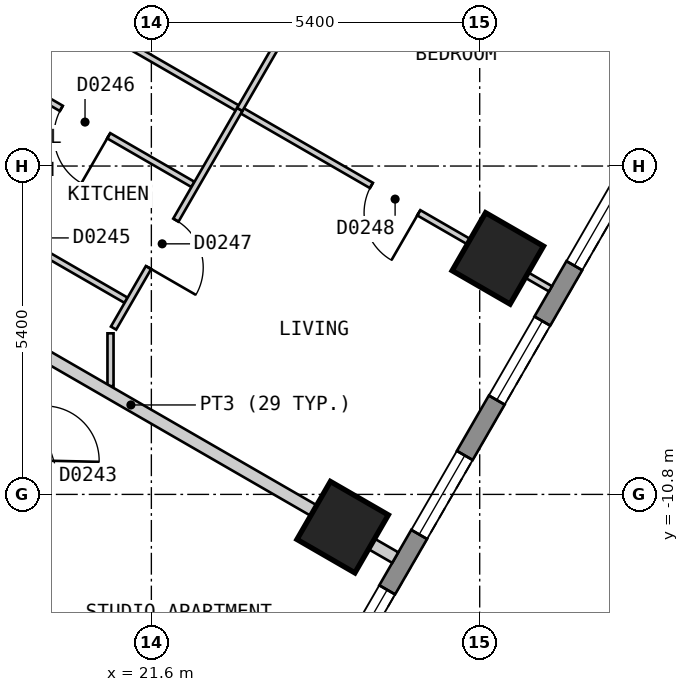
"""IFC4 building model, lengths in metres.
Left out: names, types, materials, properties, quantities, classifications, styles, units other than length and angle.
Written with IfcOpenShell. Run it as: python <this file> out.ifc"""

import sys

from ifc_helpers import new_model, si_unit, direction, frame, frame_2d, origin, origin_2d, place, context, subcontext, project, spatial, polyline, rectangle, outline, extrude, element, fill, save


model = new_model("IFC4")
c1 = context("Model", 3, precision=1e-05, world=origin(), true_north=direction((0.0, 1.0)))
c2 = subcontext(c1, "Body", "Model", "MODEL_VIEW")
j1 = project(units=[si_unit("LENGTHUNIT", "METRE"), si_unit("PLANEANGLEUNIT", "RADIAN")], contexts=[c1])
p1 = place(None, origin())
s1 = spatial("IfcSite", under=j1, at=p1, CompositionType="ELEMENT")
p2 = place(p1, origin())
s2 = spatial("IfcBuilding", under=s1, at=p2, CompositionType="ELEMENT")
p3 = place(p2, frame((0.0, 0.0, 41.4)))
s3 = spatial("IfcBuildingStorey", under=s2, at=p3, CompositionType="ELEMENT", Elevation=41.4)
for number, where, z_axis, x_axis in (
    (1, (24.746, -11.339, 0.0), (0.0, 0.0, 1.0), (0.5, 0.866, 0.0)),
    (2, (27.298, -6.919, 0.0), (0.0, 0.0, 1.0), (0.5, 0.866, 0.0)),
):
    element("IfcColumn", number, at=place(p3, frame(where, z_axis=z_axis, x_axis=x_axis)), inside=s3, PredefinedType="COLUMN", context=c2, shape_type="SweptSolid", body=[
        extrude(rectangle(XDim=1.1, YDim=1.1, at=origin_2d()), origin(), (0.0, 0.0, 1.0), 3.0),
    ])
p4 = place(p3, frame((17.71, -25.825, 0.0), z_axis=(0.0, 0.0, 1.0), x_axis=(0.500001938803, 0.866024284413, 0.0)))
e3 = element("IfcWall", 3, at=p4, inside=s3, PredefinedType="SOLIDWALL", context=c2, shape_type="SweptSolid", body=[
    extrude(outline(polyline([(0.0, -0.15), (27.02, -0.15), (26.94, 0.15), (0.08, 0.15), (0.0, -0.15)])), origin(), (0.0, 0.0, 1.0), 2.7),
])
p5 = place(p4, frame((1.277, 0.0, 0.15)))
e4 = element("IfcOpeningElement", 4, at=p5, cuts=e3, PredefinedType="OPENING", context=c2, shape_type="SweptSolid", body=[
    extrude(rectangle(XDim=1.5, YDim=2.1, at=frame_2d((0.75, 1.05))), frame((0.0, 0.16, 0.0), z_axis=(0.0, -1.0, 0.0), x_axis=(1.0, 0.0, 0.0)), (0.0, 0.0, 1.0), 0.32),
])
p6 = place(p4, frame((3.829, 0.0, 0.15)))
e5 = element("IfcOpeningElement", 5, at=p6, cuts=e3, PredefinedType="OPENING", context=c2, shape_type="SweptSolid", body=[
    extrude(rectangle(XDim=1.5, YDim=2.1, at=frame_2d((0.75, 1.05))), frame((0.0, 0.16, 0.0), z_axis=(0.0, -1.0, 0.0), x_axis=(1.0, 0.0, 0.0)), (0.0, 0.0, 1.0), 0.32),
])
p7 = place(p4, frame((6.382, 0.0, 0.15)))
e6 = element("IfcOpeningElement", 6, at=p7, cuts=e3, PredefinedType="OPENING", context=c2, shape_type="SweptSolid", body=[
    extrude(rectangle(XDim=1.5, YDim=2.1, at=frame_2d((0.75, 1.05))), frame((0.0, 0.16, 0.0), z_axis=(0.0, -1.0, 0.0), x_axis=(1.0, 0.0, 0.0)), (0.0, 0.0, 1.0), 0.32),
])
p8 = place(p4, frame((8.933, 0.0, 0.15)))
e7 = element("IfcOpeningElement", 7, at=p8, cuts=e3, PredefinedType="OPENING", context=c2, shape_type="SweptSolid", body=[
    extrude(rectangle(XDim=1.5, YDim=2.1, at=frame_2d((0.75, 1.05))), frame((0.0, 0.16, 0.0), z_axis=(0.0, -1.0, 0.0), x_axis=(1.0, 0.0, 0.0)), (0.0, 0.0, 1.0), 0.32),
])
p9 = place(p4, frame((11.485, 0.0, 0.15)))
e8 = element("IfcOpeningElement", 8, at=p9, cuts=e3, PredefinedType="OPENING", context=c2, shape_type="SweptSolid", body=[
    extrude(rectangle(XDim=1.5, YDim=2.1, at=frame_2d((0.75, 1.05))), frame((0.0, 0.16, 0.0), z_axis=(0.0, -1.0, 0.0), x_axis=(1.0, 0.0, 0.0)), (0.0, 0.0, 1.0), 0.32),
])
p10 = place(p4, frame((14.037, 0.0, 0.15)))
e9 = element("IfcOpeningElement", 9, at=p10, cuts=e3, PredefinedType="OPENING", context=c2, shape_type="SweptSolid", body=[
    extrude(rectangle(XDim=1.5, YDim=2.1, at=frame_2d((0.75, 1.05))), frame((0.0, 0.16, 0.0), z_axis=(0.0, -1.0, 0.0), x_axis=(1.0, 0.0, 0.0)), (0.0, 0.0, 1.0), 0.32),
])
p11 = place(p4, frame((16.589, 0.0, 0.15)))
e10 = element("IfcOpeningElement", 10, at=p11, cuts=e3, PredefinedType="OPENING", context=c2, shape_type="SweptSolid", body=[
    extrude(rectangle(XDim=1.5, YDim=2.1, at=frame_2d((0.75, 1.05))), frame((0.0, 0.16, 0.0), z_axis=(0.0, -1.0, 0.0), x_axis=(1.0, 0.0, 0.0)), (0.0, 0.0, 1.0), 0.32),
])
p12 = place(p4, frame((19.141, 0.0, 0.15)))
e11 = element("IfcOpeningElement", 11, at=p12, cuts=e3, PredefinedType="OPENING", context=c2, shape_type="SweptSolid", body=[
    extrude(rectangle(XDim=1.5, YDim=2.1, at=frame_2d((0.75, 1.05))), frame((0.0, 0.16, 0.0), z_axis=(0.0, -1.0, 0.0), x_axis=(1.0, 0.0, 0.0)), (0.0, 0.0, 1.0), 0.32),
])
p13 = place(p4, frame((21.693, 0.0, 0.15)))
e12 = element("IfcOpeningElement", 12, at=p13, cuts=e3, PredefinedType="OPENING", context=c2, shape_type="SweptSolid", body=[
    extrude(rectangle(XDim=1.5, YDim=2.1, at=frame_2d((0.75, 1.05))), frame((0.0, 0.16, 0.0), z_axis=(0.0, -1.0, 0.0), x_axis=(1.0, 0.0, 0.0)), (0.0, 0.0, 1.0), 0.32),
])
p14 = place(p4, frame((24.244, 0.0, 0.15)))
e13 = element("IfcOpeningElement", 13, at=p14, cuts=e3, PredefinedType="OPENING", context=c2, shape_type="SweptSolid", body=[
    extrude(rectangle(XDim=1.5, YDim=2.1, at=frame_2d((0.75, 1.05))), frame((0.0, 0.16, 0.0), z_axis=(0.0, -1.0, 0.0), x_axis=(1.0, 0.0, 0.0)), (0.0, 0.0, 1.0), 0.32),
])
p15 = place(p3, frame((16.864, -6.789, 0.0), z_axis=(0.0, 0.0, 1.0), x_axis=(0.500058020612, 0.865991902977, 0.0)))
e14 = element("IfcWall", 14, at=p15, inside=s3, PredefinedType="PARTITIONING", context=c2, shape_type="SweptSolid", body=[
    extrude(rectangle(XDim=7.725, YDim=0.2, at=frame_2d((3.863, 0.0))), origin(), (0.0, 0.0, 1.0), 2.7),
])
p16 = place(p15, frame((2.052, 0.0, 0.0)))
e15 = element("IfcOpeningElement", 15, at=p16, cuts=e14, PredefinedType="OPENING", context=c2, shape_type="SweptSolid", body=[
    extrude(rectangle(XDim=1.0, YDim=2.1, at=frame_2d((0.5, 1.05))), frame((0.0, 0.11, 0.0), z_axis=(0.0, -1.0, 0.0), x_axis=(1.0, 0.0, 0.0)), (0.0, 0.0, 1.0), 0.22),
])
p17 = place(p3, frame((17.677, -5.582, 0.0), z_axis=(0.0, 0.0, 1.0), x_axis=(0.866015917575, -0.500016430238, 0.0)))
e16 = element("IfcWall", 16, at=p17, inside=s3, PredefinedType="PARTITIONING", context=c2, shape_type="SweptSolid", body=[
    extrude(rectangle(XDim=4.05, YDim=0.1, at=frame_2d((2.025, 0.0))), origin(), (0.0, 0.0, 1.0), 2.7),
])
p18 = place(p17, frame((1.6, 0.0, 0.0)))
e17 = element("IfcOpeningElement", 17, at=p18, cuts=e16, PredefinedType="OPENING", context=c2, shape_type="SweptSolid", body=[
    extrude(rectangle(XDim=0.8, YDim=2.1, at=frame_2d((0.4, 1.05))), frame((0.0, 0.06, 0.0), z_axis=(0.0, -1.0, 0.0), x_axis=(1.0, 0.0, 0.0)), (0.0, 0.0, 1.0), 0.12),
])
p19 = place(p3, frame((18.777, -3.677, 0.0), z_axis=(0.0, 0.0, 1.0), x_axis=(0.866000843773, -0.500042536776, 0.0)))
e18 = element("IfcWall", 18, at=p19, inside=s3, PredefinedType="PARTITIONING", context=c2, shape_type="SweptSolid", body=[
    extrude(rectangle(XDim=4.05, YDim=0.1, at=frame_2d((2.025, 0.0))), origin(), (0.0, 0.0, 1.0), 2.7),
])
p20 = place(p19, frame((1.55, 0.0, 0.0)))
e19 = element("IfcOpeningElement", 19, at=p20, cuts=e18, PredefinedType="OPENING", context=c2, shape_type="SweptSolid", body=[
    extrude(rectangle(XDim=0.9, YDim=2.1, at=frame_2d((0.45, 1.05))), frame((0.0, 0.06, 0.0), z_axis=(0.0, -1.0, 0.0), x_axis=(1.0, 0.0, 0.0)), (0.0, 0.0, 1.0), 0.12),
])
p21 = place(p3, frame((19.503, -2.419, 0.0), z_axis=(0.0, 0.0, 1.0), x_axis=(0.866047370643, -0.499961950354, 0.0)))
e20 = element("IfcWall", 20, at=p21, inside=s3, PredefinedType="PARTITIONING", context=c2, shape_type="SweptSolid", body=[
    extrude(rectangle(XDim=10.001, YDim=0.1, at=frame_2d((5.0, 0.0))), origin(), (0.0, 0.0, 1.0), 2.7),
])
p22 = place(p21, frame((6.6, 0.0, 0.0)))
e21 = element("IfcOpeningElement", 21, at=p22, cuts=e20, PredefinedType="OPENING", context=c2, shape_type="SweptSolid", body=[
    extrude(rectangle(XDim=0.9, YDim=2.1, at=frame_2d((0.45, 1.05))), frame((0.0, 0.06, 0.0), z_axis=(0.0, -1.0, 0.0), x_axis=(1.0, 0.0, 0.0)), (0.0, 0.0, 1.0), 0.12),
])
p23 = place(p3, frame((20.978, -8.065, 0.0), z_axis=(0.0, 0.0, 1.0), x_axis=(0.499965068118, 0.866045570776, 0.0)))
e22 = element("IfcWall", 22, at=p23, inside=s3, PredefinedType="PARTITIONING", context=c2, shape_type="SweptSolid", body=[
    extrude(rectangle(XDim=4.152, YDim=0.1, at=frame_2d((2.076, 0.0))), origin(), (0.0, 0.0, 1.0), 2.7),
])
p24 = place(p23, frame((1.15, 0.0, 0.0)))
e23 = element("IfcOpeningElement", 23, at=p24, cuts=e22, PredefinedType="OPENING", context=c2, shape_type="SweptSolid", body=[
    extrude(rectangle(XDim=0.9, YDim=2.1, at=frame_2d((0.45, 1.05))), frame((0.0, 0.06, 0.0), z_axis=(0.0, -1.0, 0.0), x_axis=(1.0, 0.0, 0.0)), (0.0, 0.0, 1.0), 0.12),
])
p25 = place(p3, frame((20.928, -9.02, 0.0), z_axis=(0.0, 0.0, 1.0), x_axis=(0.0, 1.0, 0.0)))
e24 = element("IfcWall", 24, at=p25, inside=s3, PredefinedType="PARTITIONING", context=c2, shape_type="SweptSolid", body=[
    extrude(rectangle(XDim=0.869, YDim=0.1, at=frame_2d((0.435, 0.0))), origin(), (0.0, 0.0, 1.0), 2.7),
])
p26 = place(p3, frame((16.788, -12.638, 0.0), z_axis=(0.0, 0.0, 1.0), x_axis=(0.866027278279, -0.499996753267, 0.0)))
e25 = element("IfcWall", 25, at=p26, inside=s3, PredefinedType="PARTITIONING", context=c2, shape_type="SweptSolid", body=[
    extrude(rectangle(XDim=7.242, YDim=0.2, at=frame_2d((3.621, 0.0))), origin(), (0.0, 0.0, 1.0), 2.7),
])
p27 = place(p3, frame((16.916, -6.819, 0.0), z_axis=(0.0, 0.0, 1.0), x_axis=(0.866028876723, -0.499993984646, 0.0)))
e26 = element("IfcWall", 26, at=p27, inside=s3, PredefinedType="PARTITIONING", context=c2, shape_type="SweptSolid", body=[
    extrude(rectangle(XDim=10.04, YDim=0.2, at=frame_2d((5.02, 0.0))), origin(), (0.0, 0.0, 1.0), 2.7),
])
p28 = place(p3, frame((23.054, -4.469, 0.0), z_axis=(0.0, 0.0, 1.0), x_axis=(0.500023345639, 0.866011924754, 0.0)))
e27 = element("IfcWall", 27, at=p28, inside=s3, PredefinedType="PARTITIONING", context=c2, shape_type="SweptSolid", body=[
    extrude(rectangle(XDim=5.104, YDim=0.1, at=frame_2d((2.552, 0.0))), origin(), (0.0, 0.0, 1.0), 2.7),
])
p29 = place(p28, frame((2.152, 0.0, 0.0)))
e28 = element("IfcOpeningElement", 28, at=p29, cuts=e27, PredefinedType="OPENING", context=c2, shape_type="SweptSolid", body=[
    extrude(rectangle(XDim=0.8, YDim=2.1, at=frame_2d((0.4, 1.05))), frame((0.0, 0.06, 0.0), z_axis=(0.0, -1.0, 0.0), x_axis=(1.0, 0.0, 0.0)), (0.0, 0.0, 1.0), 0.12),
])
p30 = place(p10, origin())
e29 = element("IfcWindow", 29, at=p30, inside=s3, PartitioningType="SINGLE_PANEL", PredefinedType="WINDOW", context=c2, shape_type="SweptSolid", body=[
    extrude(rectangle(XDim=1.5, YDim=2.1, at=frame_2d((0.75, 1.05))), frame((0.0, 0.03, 0.0), z_axis=(0.0, -1.0, 0.0), x_axis=(1.0, 0.0, 0.0)), (0.0, 0.0, 1.0), 0.06),
])
fill(e9, e29)
p31 = place(p11, origin())
e30 = element("IfcWindow", 30, at=p31, inside=s3, PartitioningType="SINGLE_PANEL", PredefinedType="WINDOW", context=c2, shape_type="SweptSolid", body=[
    extrude(rectangle(XDim=1.5, YDim=2.1, at=frame_2d((0.75, 1.05))), frame((0.0, 0.03, 0.0), z_axis=(0.0, -1.0, 0.0), x_axis=(1.0, 0.0, 0.0)), (0.0, 0.0, 1.0), 0.06),
])
fill(e10, e30)
p32 = place(p12, origin())
e31 = element("IfcWindow", 31, at=p32, inside=s3, PartitioningType="SINGLE_PANEL", PredefinedType="WINDOW", context=c2, shape_type="SweptSolid", body=[
    extrude(rectangle(XDim=1.5, YDim=2.1, at=frame_2d((0.75, 1.05))), frame((0.0, 0.03, 0.0), z_axis=(0.0, -1.0, 0.0), x_axis=(1.0, 0.0, 0.0)), (0.0, 0.0, 1.0), 0.06),
])
fill(e11, e31)
p33 = place(p13, origin())
e32 = element("IfcWindow", 32, at=p33, inside=s3, PartitioningType="SINGLE_PANEL", PredefinedType="WINDOW", context=c2, shape_type="SweptSolid", body=[
    extrude(rectangle(XDim=1.5, YDim=2.1, at=frame_2d((0.75, 1.05))), frame((0.0, 0.03, 0.0), z_axis=(0.0, -1.0, 0.0), x_axis=(1.0, 0.0, 0.0)), (0.0, 0.0, 1.0), 0.06),
])
fill(e12, e32)
p34 = place(p20, origin())
e33 = element("IfcDoor", 33, at=p34, inside=s3, OperationType="SINGLE_SWING_RIGHT", PredefinedType="DOOR", context=c2, shape_type="SweptSolid", body=[
    extrude(rectangle(XDim=0.9, YDim=2.1, at=frame_2d((0.45, 1.05))), frame((0.0, 0.025, 0.0), z_axis=(0.0, -1.0, 0.0), x_axis=(1.0, 0.0, 0.0)), (0.0, 0.0, 1.0), 0.05),
])
fill(e19, e33)
p35 = place(p24, origin())
e34 = element("IfcDoor", 34, at=p35, inside=s3, OperationType="SINGLE_SWING_LEFT", PredefinedType="DOOR", context=c2, shape_type="SweptSolid", body=[
    extrude(rectangle(XDim=0.9, YDim=2.1, at=frame_2d((0.45, 1.05))), frame((0.0, 0.025, 0.0), z_axis=(0.0, -1.0, 0.0), x_axis=(1.0, 0.0, 0.0)), (0.0, 0.0, 1.0), 0.05),
])
fill(e23, e34)
p36 = place(p22, origin())
e35 = element("IfcDoor", 35, at=p36, inside=s3, OperationType="SINGLE_SWING_RIGHT", PredefinedType="DOOR", context=c2, shape_type="SweptSolid", body=[
    extrude(rectangle(XDim=0.9, YDim=2.1, at=frame_2d((0.45, 1.05))), frame((0.0, 0.025, 0.0), z_axis=(0.0, -1.0, 0.0), x_axis=(1.0, 0.0, 0.0)), (0.0, 0.0, 1.0), 0.05),
])
fill(e21, e35)
save(model, sys.argv[1])
